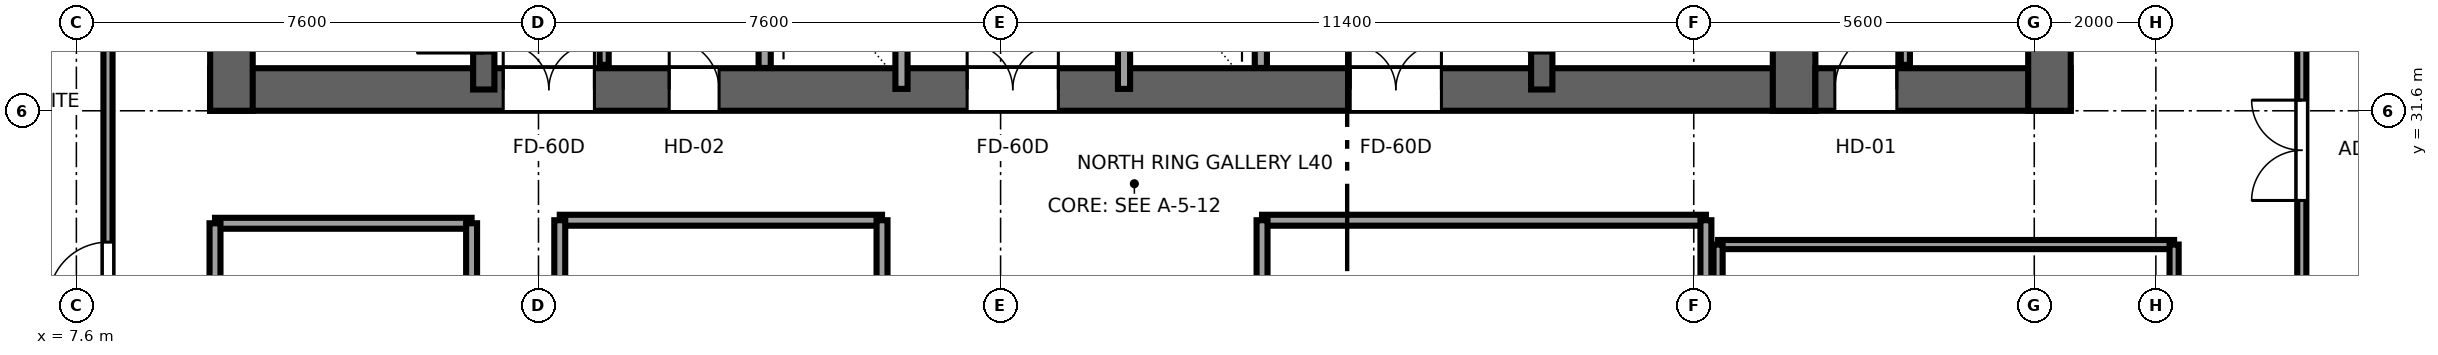
"""IFC4 building model, lengths in metres.
Left out: names, types, materials, properties, quantities, classifications, styles, units other than length and angle.
Written with IfcOpenShell. Run it as: python <this file> out.ifc"""

import sys

from ifc_helpers import new_model, si_unit, direction, frame, frame_2d, origin, place, context, subcontext, project, spatial, rectangle, extrude, source, transform, mapped, element, fill, save


model = new_model("IFC4")
c1 = context("Model", 3, precision=1e-05, world=origin(), true_north=direction((0.0, 1.0)))
c2 = subcontext(c1, "Body", "Model", "MODEL_VIEW")
j1 = project(units=[si_unit("LENGTHUNIT", "METRE"), si_unit("PLANEANGLEUNIT", "RADIAN")], contexts=[c1])
p1 = place(None, origin())
s1 = spatial("IfcSite", under=j1, at=p1, CompositionType="ELEMENT")
p2 = place(p1, origin())
s2 = spatial("IfcBuilding", under=s1, at=p2, CompositionType="ELEMENT")
p3 = place(p2, frame((0.0, 0.0, 154.15)))
s3 = spatial("IfcBuildingStorey", under=s2, at=p3, CompositionType="ELEMENT", Elevation=154.15)
p4 = place(p3, frame((9.8, 31.95, 0.0), z_axis=(0.0, 0.0, 1.0), x_axis=(1.0, 0.0, 0.0)))
e1 = element("IfcWall", 1, at=p4, inside=s3, PredefinedType="SHEAR", context=c2, shape_type="SweptSolid", body=[
    extrude(rectangle(XDim=26.4, YDim=0.7, at=frame_2d((13.2, 0.0))), origin(), (0.0, 0.0, 1.0), 3.55),
])
p5 = place(p4, frame((6.32, 0.0, 0.0), z_axis=(0.0, 0.0, 1.0), x_axis=(-1.0, 0.0, 0.0)))
e2 = element("IfcOpeningElement", 2, at=p5, cuts=e1, PredefinedType="OPENING", context=c2, shape_type="SweptSolid", body=[
    extrude(rectangle(XDim=1.5, YDim=2.04, at=frame_2d((0.75, 1.02))), frame((0.0, 0.36, 0.0), z_axis=(0.0, -1.0, 0.0), x_axis=(1.0, 0.0, 0.0)), (0.0, 0.0, 1.0), 0.72),
])
p6 = place(p4, frame((13.95, 0.0, 0.0), z_axis=(0.0, 0.0, 1.0), x_axis=(-1.0, 0.0, 0.0)))
e3 = element("IfcOpeningElement", 3, at=p6, cuts=e1, PredefinedType="OPENING", context=c2, shape_type="SweptSolid", body=[
    extrude(rectangle(XDim=1.5, YDim=2.04, at=frame_2d((0.75, 1.02))), frame((0.0, 0.36, 0.0), z_axis=(0.0, -1.0, 0.0), x_axis=(1.0, 0.0, 0.0)), (0.0, 0.0, 1.0), 0.72),
])
p7 = place(p4, frame((20.25, 0.0, 0.0), z_axis=(0.0, 0.0, 1.0), x_axis=(-1.0, 0.0, 0.0)))
e4 = element("IfcOpeningElement", 4, at=p7, cuts=e1, PredefinedType="OPENING", context=c2, shape_type="SweptSolid", body=[
    extrude(rectangle(XDim=1.5, YDim=2.04, at=frame_2d((0.75, 1.02))), frame((0.0, 0.36, 0.0), z_axis=(0.0, -1.0, 0.0), x_axis=(1.0, 0.0, 0.0)), (0.0, 0.0, 1.0), 0.72),
])
p8 = place(p4, frame((8.37, 0.0, 0.0), z_axis=(0.0, 0.0, 1.0), x_axis=(-1.0, 0.0, 0.0)))
e5 = element("IfcOpeningElement", 5, at=p8, cuts=e1, PredefinedType="OPENING", context=c2, shape_type="SweptSolid", body=[
    extrude(rectangle(XDim=0.82, YDim=2.01, at=frame_2d((0.41, 1.005))), frame((0.0, 0.36, 0.0), z_axis=(0.0, -1.0, 0.0), x_axis=(1.0, 0.0, 0.0)), (0.0, 0.0, 1.0), 0.72),
])
for number, where, z_axis, x_axis in (
    (6, (10.15, 31.6, 0.0), (0.0, 0.0, 1.0), (0.0, 1.0, 0.0)),
    (7, (35.85, 31.6, 0.0), (0.0, 0.0, 1.0), (0.0, 1.0, 0.0)),
):
    element("IfcWall", number, at=place(p3, frame(where, z_axis=z_axis, x_axis=x_axis)), inside=s3, PredefinedType="SHEAR", context=c2, shape_type="SweptSolid", body=[
        extrude(rectangle(XDim=13.6, YDim=0.7, at=frame_2d((6.8, 0.0))), origin(), (0.0, 0.0, 1.0), 3.55),
    ])
p9 = place(p3, frame((14.3, 31.95, 0.0), z_axis=(0.0, 0.0, 1.0), x_axis=(0.0, 1.0, 0.0)))
e8 = element("IfcWall", 8, at=p9, inside=s3, PredefinedType="SHEAR", context=c2, shape_type="SweptSolid", body=[
    extrude(rectangle(XDim=12.9, YDim=0.35, at=frame_2d((6.45, 0.0))), origin(), (0.0, 0.0, 1.0), 3.55),
])
p10 = place(p9, frame((0.6, 0.0, 0.0)))
e9 = element("IfcOpeningElement", 9, at=p10, cuts=e8, PredefinedType="OPENING", context=c2, shape_type="SweptSolid", body=[
    extrude(rectangle(XDim=1.1, YDim=2.12, at=frame_2d((0.55, 1.06))), frame((0.0, 0.185, 0.0), z_axis=(0.0, -1.0, 0.0), x_axis=(1.0, 0.0, 0.0)), (0.0, 0.0, 1.0), 0.37),
])
p11 = place(p3, frame((31.7, 31.95, 0.0), z_axis=(0.0, 0.0, 1.0), x_axis=(0.0, 1.0, 0.0)))
e10 = element("IfcWall", 10, at=p11, inside=s3, PredefinedType="SHEAR", context=c2, shape_type="SweptSolid", body=[
    extrude(rectangle(XDim=12.9, YDim=0.35, at=frame_2d((6.45, 0.0))), origin(), (0.0, 0.0, 1.0), 3.55),
])
p12 = place(p11, frame((1.7, 0.0, 0.0), z_axis=(0.0, 0.0, 1.0), x_axis=(-1.0, 0.0, 0.0)))
e11 = element("IfcOpeningElement", 11, at=p12, cuts=e10, PredefinedType="OPENING", context=c2, shape_type="SweptSolid", body=[
    extrude(rectangle(XDim=1.1, YDim=2.12, at=frame_2d((0.55, 1.06))), frame((0.0, 0.185, 0.0), z_axis=(0.0, -1.0, 0.0), x_axis=(1.0, 0.0, 0.0)), (0.0, 0.0, 1.0), 0.37),
])
p13 = place(p3, frame((36.2, 31.95, 0.0), z_axis=(0.0, 0.0, 1.0), x_axis=(1.0, 0.0, 0.0)))
e12 = element("IfcWall", 12, at=p13, inside=s3, PredefinedType="SHEAR", context=c2, shape_type="SweptSolid", body=[
    extrude(rectangle(XDim=4.2, YDim=0.7, at=frame_2d((2.1, 0.0))), origin(), (0.0, 0.0, 1.0), 3.55),
])
p14 = place(p13, frame((1.34, 0.0, 0.0), z_axis=(0.0, 0.0, 1.0), x_axis=(-1.0, 0.0, 0.0)))
e13 = element("IfcOpeningElement", 13, at=p14, cuts=e12, PredefinedType="OPENING", context=c2, shape_type="SweptSolid", body=[
    extrude(rectangle(XDim=1.02, YDim=2.03, at=frame_2d((0.51, 1.015))), frame((0.0, 0.36, 0.0), z_axis=(0.0, -1.0, 0.0), x_axis=(1.0, 0.0, 0.0)), (0.0, 0.0, 1.0), 0.72),
])
p15 = place(p3, frame((40.05, 31.6, 0.0), z_axis=(0.0, 0.0, 1.0), x_axis=(0.0, 1.0, 0.0)))
e14 = element("IfcWall", 14, at=p15, inside=s3, PredefinedType="SHEAR", context=c2, shape_type="SweptSolid", body=[
    extrude(rectangle(XDim=13.6, YDim=0.7, at=frame_2d((6.8, 0.0))), origin(), (0.0, 0.0, 1.0), 3.55),
])
for number, where, z_axis, x_axis in (
    (15, (18.92, 32.304, 0.0), (0.0, 0.0, 1.0), (0.0, 1.0, 0.0)),
    (16, (27.08, 32.304, 0.0), (0.0, 0.0, 1.0), (0.0, 1.0, 0.0)),
):
    element("IfcWall", number, at=place(p3, frame(where, z_axis=z_axis, x_axis=x_axis)), inside=s3, PredefinedType="SOLIDWALL", context=c2, shape_type="SweptSolid", body=[
        extrude(rectangle(XDim=3.846, YDim=0.2, at=frame_2d((1.923, 0.0))), origin(), (0.0, 0.0, 1.0), 3.37),
    ])
p16 = place(p3, frame((21.17, 31.96, 0.0), z_axis=(0.0, 0.0, 1.0), x_axis=(0.0, 1.0, 0.0)))
e17 = element("IfcWall", 17, at=p16, inside=s3, PredefinedType="SOLIDWALL", context=c2, shape_type="SweptSolid", body=[
    extrude(rectangle(XDim=12.58, YDim=0.2, at=frame_2d((6.29, 0.0))), origin(), (0.0, 0.0, 1.0), 3.37),
])
p17 = place(p16, frame((5.74, 0.0, 0.0)))
e18 = element("IfcOpeningElement", 18, at=p17, cuts=e17, PredefinedType="OPENING", context=c2, shape_type="SweptSolid", body=[
    extrude(rectangle(XDim=1.1, YDim=2.12, at=frame_2d((0.55, 1.06))), frame((0.0, 0.11, 0.0), z_axis=(0.0, -1.0, 0.0), x_axis=(1.0, 0.0, 0.0)), (0.0, 0.0, 1.0), 0.22),
])
p18 = place(p16, frame((8.24, 0.0, 0.0)))
e19 = element("IfcOpeningElement", 19, at=p18, cuts=e17, PredefinedType="OPENING", context=c2, shape_type="SweptSolid", body=[
    extrude(rectangle(XDim=1.1, YDim=2.12, at=frame_2d((0.55, 1.06))), frame((0.0, 0.11, 0.0), z_axis=(0.0, -1.0, 0.0), x_axis=(1.0, 0.0, 0.0)), (0.0, 0.0, 1.0), 0.22),
])
p19 = place(p3, frame((24.83, 31.96, 0.0), z_axis=(0.0, 0.0, 1.0), x_axis=(0.0, 1.0, 0.0)))
e20 = element("IfcWall", 20, at=p19, inside=s3, PredefinedType="SOLIDWALL", context=c2, shape_type="SweptSolid", body=[
    extrude(rectangle(XDim=12.58, YDim=0.2, at=frame_2d((6.29, 0.0))), origin(), (0.0, 0.0, 1.0), 3.37),
])
p20 = place(p19, frame((5.74, 0.0, 0.0)))
e21 = element("IfcOpeningElement", 21, at=p20, cuts=e20, PredefinedType="OPENING", context=c2, shape_type="SweptSolid", body=[
    extrude(rectangle(XDim=1.1, YDim=2.12, at=frame_2d((0.55, 1.06))), frame((0.0, 0.11, 0.0), z_axis=(0.0, -1.0, 0.0), x_axis=(1.0, 0.0, 0.0)), (0.0, 0.0, 1.0), 0.22),
])
p21 = place(p19, frame((8.24, 0.0, 0.0)))
e22 = element("IfcOpeningElement", 22, at=p21, cuts=e20, PredefinedType="OPENING", context=c2, shape_type="SweptSolid", body=[
    extrude(rectangle(XDim=1.1, YDim=2.12, at=frame_2d((0.55, 1.06))), frame((0.0, 0.11, 0.0), z_axis=(0.0, -1.0, 0.0), x_axis=(1.0, 0.0, 0.0)), (0.0, 0.0, 1.0), 0.22),
])
p22 = place(p3, frame((16.28, 32.355, 0.0), z_axis=(0.0, 0.0, 1.0), x_axis=(0.0, 1.0, 0.0)))
e23 = element("IfcWall", 23, at=p22, inside=s3, PredefinedType="PARTITIONING", context=c2, shape_type="SweptSolid", body=[
    extrude(rectangle(XDim=0.865, YDim=0.15, at=frame_2d((0.433, 0.0))), origin(), (0.0, 0.0, 1.0), 3.37),
])
p23 = place(p3, frame((37.68, 32.355, 0.0), z_axis=(0.0, 0.0, 1.0), x_axis=(0.0, 1.0, 0.0)))
e24 = element("IfcWall", 24, at=p23, inside=s3, PredefinedType="PARTITIONING", context=c2, shape_type="SweptSolid", body=[
    extrude(rectangle(XDim=3.845, YDim=0.15, at=frame_2d((1.922, 0.0))), origin(), (0.0, 0.0, 1.0), 3.37),
])
p24 = place(p23, frame((1.413, 0.0, 0.0)))
e25 = element("IfcOpeningElement", 25, at=p24, cuts=e24, PredefinedType="OPENING", context=c2, shape_type="SweptSolid", body=[
    extrude(rectangle(XDim=1.02, YDim=2.03, at=frame_2d((0.51, 1.015))), frame((0.0, 0.085, 0.0), z_axis=(0.0, -1.0, 0.0), x_axis=(1.0, 0.0, 0.0)), (0.0, 0.0, 1.0), 0.17),
])
p25 = place(p3, frame((8.12, 23.58, 0.0), z_axis=(0.0, 0.0, 1.0), x_axis=(0.0, 1.0, 0.0)))
e26 = element("IfcWall", 26, at=p25, inside=s3, PredefinedType="PARTITIONING", context=c2, shape_type="SweptSolid", body=[
    extrude(rectangle(XDim=10.74, YDim=0.15, at=frame_2d((5.37, 0.0))), origin(), (0.0, 0.0, 1.0), 3.37),
])
p26 = place(p25, frame((4.88, 0.0, 0.0)))
e27 = element("IfcOpeningElement", 27, at=p26, cuts=e26, PredefinedType="OPENING", context=c2, shape_type="SweptSolid", body=[
    extrude(rectangle(XDim=0.98, YDim=2.12, at=frame_2d((0.49, 1.06))), frame((0.0, 0.085, 0.0), z_axis=(0.0, -1.0, 0.0), x_axis=(1.0, 0.0, 0.0)), (0.0, 0.0, 1.0), 0.17),
])
p27 = place(p3, frame((44.2, 27.3, 0.0), z_axis=(0.0, 0.0, 1.0), x_axis=(0.0, 1.0, 0.0)))
e28 = element("IfcWall", 28, at=p27, inside=s3, PredefinedType="PARTITIONING", context=c2, shape_type="SweptSolid", body=[
    extrude(rectangle(XDim=7.3, YDim=0.15, at=frame_2d((3.65, 0.0))), origin(), (0.0, 0.0, 1.0), 3.37),
])
p28 = place(p27, frame((2.825, 0.0, 0.0)))
e29 = element("IfcOpeningElement", 29, at=p28, cuts=e28, PredefinedType="OPENING", context=c2, shape_type="SweptSolid", body=[
    extrude(rectangle(XDim=1.65, YDim=2.15, at=frame_2d((0.825, 1.075))), frame((0.0, 0.085, 0.0), z_axis=(0.0, -1.0, 0.0), x_axis=(1.0, 0.0, 0.0)), (0.0, 0.0, 1.0), 0.17),
])
p29 = place(p3, frame((9.88, 29.75, 0.0), z_axis=(0.0, 0.0, 1.0), x_axis=(1.0, 0.0, 0.0)))
e30 = element("IfcWall", 30, at=p29, inside=s3, PredefinedType="PARTITIONING", context=c2, shape_type="SweptSolid", body=[
    extrude(rectangle(XDim=4.22, YDim=0.18, at=frame_2d((2.11, 0.0))), origin(), (0.0, 0.0, 1.0), 3.37),
])
for number, where, z_axis, x_axis in (
    (31, (9.88, 23.5, 0.0), (0.0, 0.0, 1.0), (0.0, 1.0, 0.0)),
    (32, (14.1, 23.5, 0.0), (0.0, 0.0, 1.0), (0.0, 1.0, 0.0)),
):
    element("IfcWall", number, at=place(p3, frame(where, z_axis=z_axis, x_axis=x_axis)), inside=s3, PredefinedType="PARTITIONING", context=c2, shape_type="SweptSolid", body=[
        extrude(rectangle(XDim=6.25, YDim=0.18, at=frame_2d((3.125, 0.0))), origin(), (0.0, 0.0, 1.0), 3.37),
    ])
p30 = place(p3, frame((27.1, 29.8, 0.0), z_axis=(0.0, 0.0, 1.0), x_axis=(1.0, 0.0, 0.0)))
e33 = element("IfcWall", 33, at=p30, inside=s3, PredefinedType="PARTITIONING", context=c2, shape_type="SweptSolid", body=[
    extrude(rectangle(XDim=7.3, YDim=0.18, at=frame_2d((3.65, 0.0))), origin(), (0.0, 0.0, 1.0), 3.37),
])
for number, where, z_axis, x_axis in (
    (34, (27.1, 23.5, 0.0), (0.0, 0.0, 1.0), (0.0, 1.0, 0.0)),
    (35, (34.4, 23.5, 0.0), (0.0, 0.0, 1.0), (0.0, 1.0, 0.0)),
):
    element("IfcWall", number, at=place(p3, frame(where, z_axis=z_axis, x_axis=x_axis)), inside=s3, PredefinedType="PARTITIONING", context=c2, shape_type="SweptSolid", body=[
        extrude(rectangle(XDim=6.3, YDim=0.18, at=frame_2d((3.15, 0.0))), origin(), (0.0, 0.0, 1.0), 3.37),
    ])
p31 = place(p3, frame((15.55, 29.8, 0.0), z_axis=(0.0, 0.0, 1.0), x_axis=(1.0, 0.0, 0.0)))
e36 = element("IfcWall", 36, at=p31, inside=s3, PredefinedType="PARTITIONING", context=c2, shape_type="SweptSolid", body=[
    extrude(rectangle(XDim=5.3, YDim=0.18, at=frame_2d((2.65, 0.0))), origin(), (0.0, 0.0, 1.0), 3.37),
])
for number, where, z_axis, x_axis in (
    (37, (15.55, 23.5, 0.0), (0.0, 0.0, 1.0), (0.0, 1.0, 0.0)),
    (38, (20.85, 23.5, 0.0), (0.0, 0.0, 1.0), (0.0, 1.0, 0.0)),
):
    element("IfcWall", number, at=place(p3, frame(where, z_axis=z_axis, x_axis=x_axis)), inside=s3, PredefinedType="PARTITIONING", context=c2, shape_type="SweptSolid", body=[
        extrude(rectangle(XDim=6.3, YDim=0.18, at=frame_2d((3.15, 0.0))), origin(), (0.0, 0.0, 1.0), 3.37),
    ])
p32 = place(p3, frame((34.6, 29.4, 0.0), z_axis=(0.0, 0.0, 1.0), x_axis=(1.0, 0.0, 0.0)))
e39 = element("IfcWall", 39, at=p32, inside=s3, PredefinedType="PARTITIONING", context=c2, shape_type="SweptSolid", body=[
    extrude(rectangle(XDim=7.5, YDim=0.15, at=frame_2d((3.75, 0.0))), origin(), (0.0, 0.0, 1.0), 3.37),
])
p33 = place(p3, frame((34.6, 23.5, 0.0), z_axis=(0.0, 0.0, 1.0), x_axis=(0.0, 1.0, 0.0)))
e40 = element("IfcWall", 40, at=p33, inside=s3, PredefinedType="PARTITIONING", context=c2, shape_type="SweptSolid", body=[
    extrude(rectangle(XDim=5.9, YDim=0.15, at=frame_2d((2.95, 0.0))), origin(), (0.0, 0.0, 1.0), 3.37),
])
p34 = place(p3, frame((42.1, 23.5, 0.0), z_axis=(0.0, 0.0, 1.0), x_axis=(0.0, 1.0, 0.0)))
e41 = element("IfcWall", 41, at=p34, inside=s3, PredefinedType="PARTITIONING", context=c2, shape_type="SweptSolid", body=[
    extrude(rectangle(XDim=5.9, YDim=0.15, at=frame_2d((2.95, 0.0))), origin(), (0.0, 0.0, 1.0), 2.16),
])
m1 = source(origin(), c2, "Body", "SweptSolid", [
    extrude(rectangle(XDim=1.1, YDim=2.12, at=frame_2d((0.55, 1.06))), frame((0.0, 0.025, 0.0), z_axis=(0.0, -1.0, 0.0), x_axis=(1.0, 0.0, 0.0)), (0.0, 0.0, 1.0), 0.05),
])
p35 = place(p10, origin())
e42 = element("IfcDoor", 42, at=p35, inside=s3, OperationType="SINGLE_SWING_LEFT", PredefinedType="DOOR", context=c2, shape_type="MappedRepresentation", body=[
    mapped(m1, transform((0.0, 0.0, 0.0), x_axis=(1.0, 0.0, 0.0), y_axis=(0.0, 1.0, 0.0), z_axis=(0.0, 0.0, 1.0), scale=1.0)),
])
fill(e9, e42)
p36 = place(p12, origin())
e43 = element("IfcDoor", 43, at=p36, inside=s3, OperationType="SINGLE_SWING_RIGHT", PredefinedType="DOOR", context=c2, shape_type="MappedRepresentation", body=[
    mapped(m1, transform((0.0, 0.0, 0.0), x_axis=(1.0, 0.0, 0.0), y_axis=(0.0, 1.0, 0.0), z_axis=(0.0, 0.0, 1.0), scale=1.0)),
])
fill(e11, e43)
m2 = source(origin(), c2, "Body", "SweptSolid", [
    extrude(rectangle(XDim=1.5, YDim=2.04, at=frame_2d((0.75, 1.02))), frame((0.0, 0.025, 0.0), z_axis=(0.0, -1.0, 0.0), x_axis=(1.0, 0.0, 0.0)), (0.0, 0.0, 1.0), 0.05),
])
p37 = place(p5, origin())
e44 = element("IfcDoor", 44, at=p37, inside=s3, OperationType="DOUBLE_DOOR_SINGLE_SWING", PredefinedType="DOOR", context=c2, shape_type="MappedRepresentation", body=[
    mapped(m2, transform((0.0, 0.0, 0.0), x_axis=(1.0, 0.0, 0.0), y_axis=(0.0, 1.0, 0.0), z_axis=(0.0, 0.0, 1.0), scale=1.0)),
])
fill(e2, e44)
p38 = place(p6, origin())
e45 = element("IfcDoor", 45, at=p38, inside=s3, OperationType="DOUBLE_DOOR_SINGLE_SWING", PredefinedType="DOOR", context=c2, shape_type="MappedRepresentation", body=[
    mapped(m2, transform((0.0, 0.0, 0.0), x_axis=(1.0, 0.0, 0.0), y_axis=(0.0, 1.0, 0.0), z_axis=(0.0, 0.0, 1.0), scale=1.0)),
])
fill(e3, e45)
p39 = place(p7, origin())
e46 = element("IfcDoor", 46, at=p39, inside=s3, OperationType="DOUBLE_DOOR_SINGLE_SWING", PredefinedType="DOOR", context=c2, shape_type="MappedRepresentation", body=[
    mapped(m2, transform((0.0, 0.0, 0.0), x_axis=(1.0, 0.0, 0.0), y_axis=(0.0, 1.0, 0.0), z_axis=(0.0, 0.0, 1.0), scale=1.0)),
])
fill(e4, e46)
m3 = source(origin(), c2, "Body", "SweptSolid", [
    extrude(rectangle(XDim=0.82, YDim=2.01, at=frame_2d((0.41, 1.005))), frame((0.0, 0.025, 0.0), z_axis=(0.0, -1.0, 0.0), x_axis=(1.0, 0.0, 0.0)), (0.0, 0.0, 1.0), 0.05),
])
p40 = place(p8, origin())
e47 = element("IfcDoor", 47, at=p40, inside=s3, OperationType="SINGLE_SWING_LEFT", PredefinedType="DOOR", context=c2, shape_type="MappedRepresentation", body=[
    mapped(m3, transform((0.0, 0.0, 0.0), x_axis=(1.0, 0.0, 0.0), y_axis=(0.0, 1.0, 0.0), z_axis=(0.0, 0.0, 1.0), scale=1.0)),
])
fill(e5, e47)
m4 = source(origin(), c2, "Body", "SweptSolid", [
    extrude(rectangle(XDim=1.02, YDim=2.03, at=frame_2d((0.51, 1.015))), frame((0.0, 0.025, 0.0), z_axis=(0.0, -1.0, 0.0), x_axis=(1.0, 0.0, 0.0)), (0.0, 0.0, 1.0), 0.05),
])
p41 = place(p14, origin())
e48 = element("IfcDoor", 48, at=p41, inside=s3, OperationType="SINGLE_SWING_RIGHT", PredefinedType="DOOR", context=c2, shape_type="MappedRepresentation", body=[
    mapped(m4, transform((0.0, 0.0, 0.0), x_axis=(1.0, 0.0, 0.0), y_axis=(0.0, 1.0, 0.0), z_axis=(0.0, 0.0, 1.0), scale=1.0)),
])
fill(e13, e48)
m5 = source(origin(), c2, "Body", "SweptSolid", [
    extrude(rectangle(XDim=0.98, YDim=2.12, at=frame_2d((0.49, 1.06))), frame((0.0, 0.025, 0.0), z_axis=(0.0, -1.0, 0.0), x_axis=(1.0, 0.0, 0.0)), (0.0, 0.0, 1.0), 0.05),
])
p42 = place(p26, origin())
e49 = element("IfcDoor", 49, at=p42, inside=s3, OperationType="SINGLE_SWING_LEFT", PredefinedType="DOOR", context=c2, shape_type="MappedRepresentation", body=[
    mapped(m5, transform((0.0, 0.0, 0.0), x_axis=(1.0, 0.0, 0.0), y_axis=(0.0, 1.0, 0.0), z_axis=(0.0, 0.0, 1.0), scale=1.0)),
])
fill(e27, e49)
m6 = source(origin(), c2, "Body", "SweptSolid", [
    extrude(rectangle(XDim=1.65, YDim=2.15, at=frame_2d((0.825, 1.075))), frame((0.0, 0.025, 0.0), z_axis=(0.0, -1.0, 0.0), x_axis=(1.0, 0.0, 0.0)), (0.0, 0.0, 1.0), 0.05),
])
p43 = place(p28, origin())
e50 = element("IfcDoor", 50, at=p43, inside=s3, OperationType="DOUBLE_DOOR_SINGLE_SWING", PredefinedType="DOOR", context=c2, shape_type="MappedRepresentation", body=[
    mapped(m6, transform((0.0, 0.0, 0.0), x_axis=(1.0, 0.0, 0.0), y_axis=(0.0, 1.0, 0.0), z_axis=(0.0, 0.0, 1.0), scale=1.0)),
])
fill(e29, e50)
save(model, sys.argv[1])
